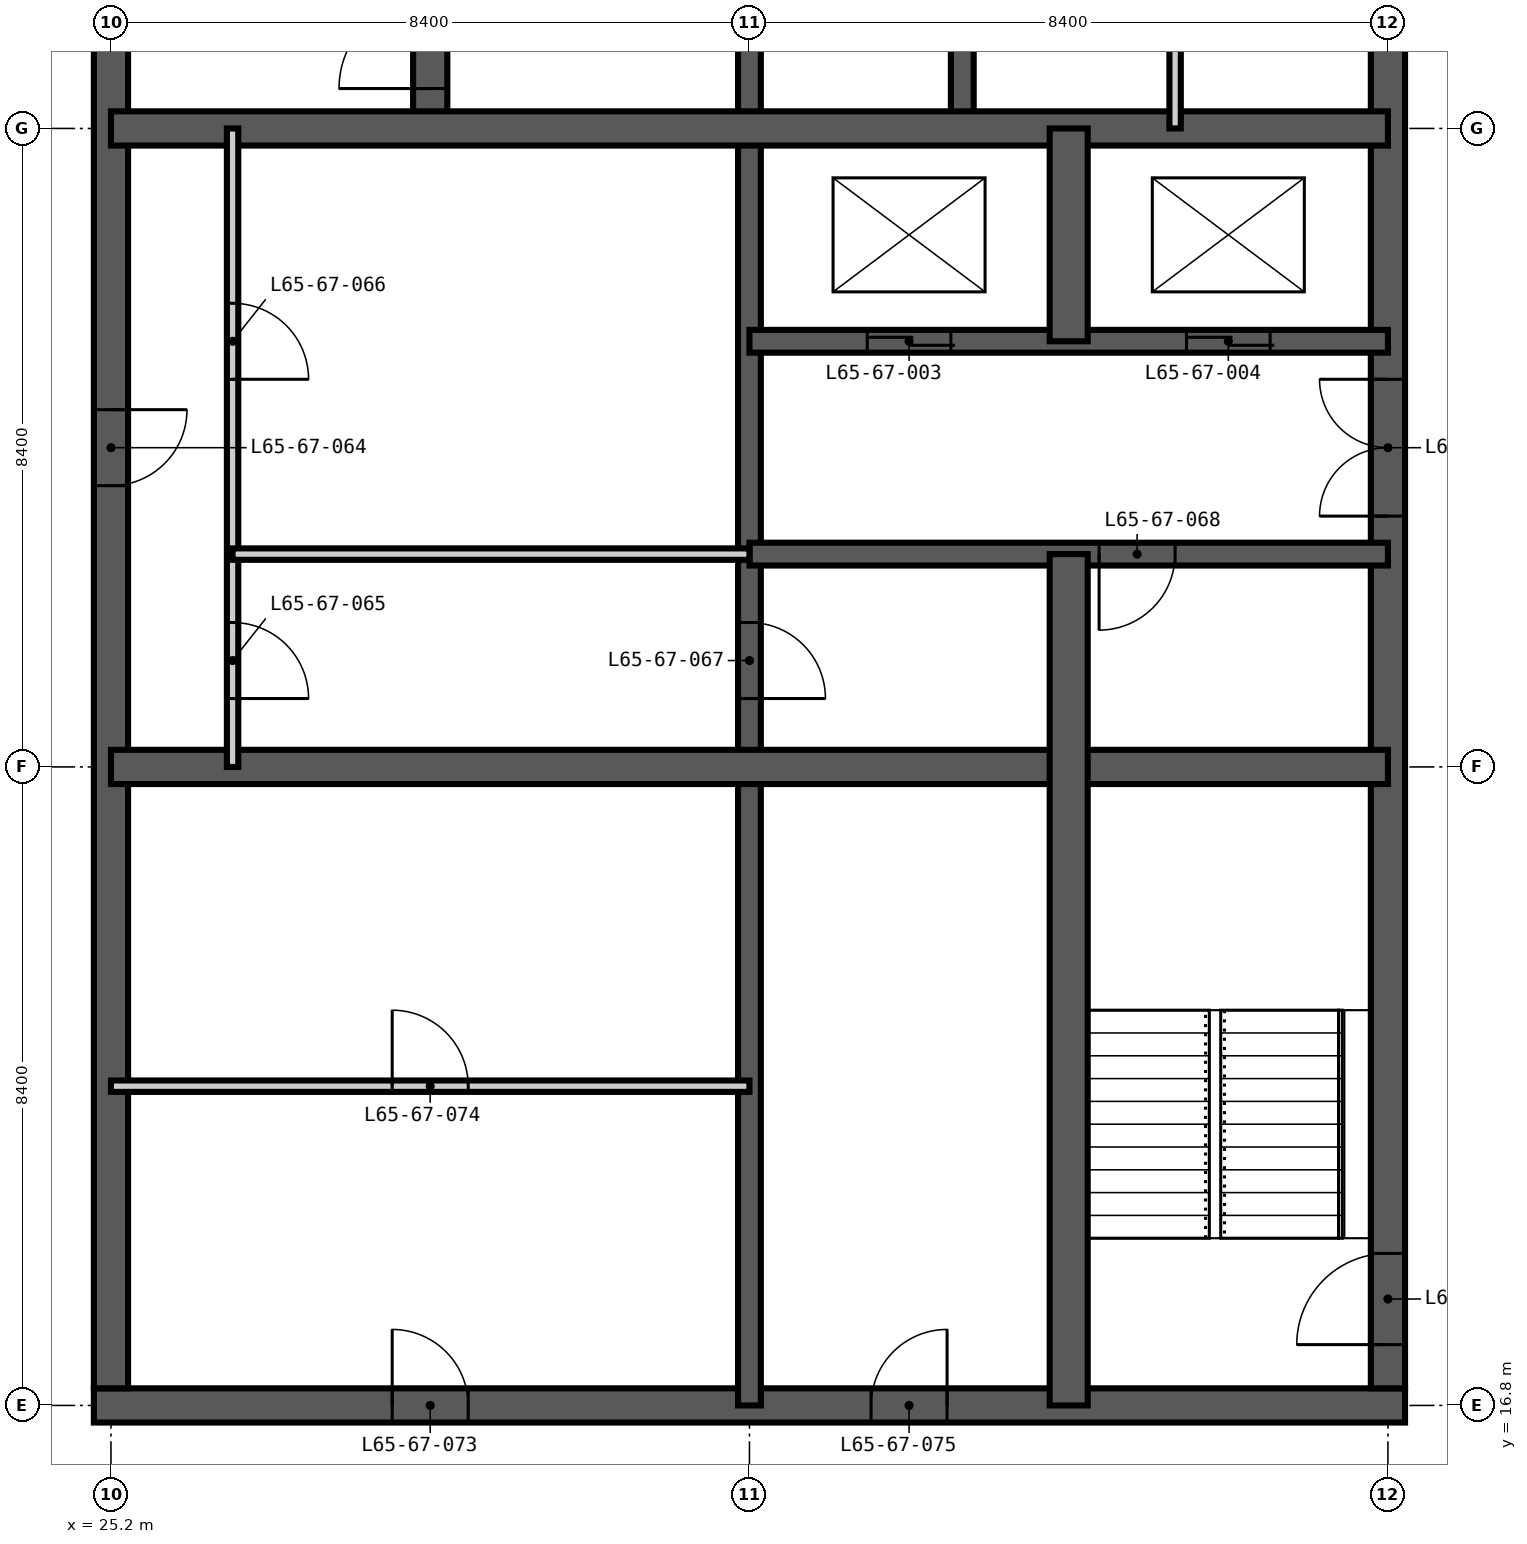
"""IFC4 building model, lengths in metres.
Left out: names, types, materials, properties, quantities, classifications, styles, units other than length and angle.
Written with IfcOpenShell. Run it as: python <this file> out.ifc"""

import sys

from ifc_helpers import new_model, si_unit, direction, frame, frame_2d, origin, place, context, subcontext, project, spatial, rectangle, extrude, element, fill, save


model = new_model("IFC4")
c1 = context("Model", 3, precision=1e-05, world=origin(), true_north=direction((0.0, 1.0)))
c2 = subcontext(c1, "Body", "Model", "MODEL_VIEW")
j1 = project(units=[si_unit("LENGTHUNIT", "METRE"), si_unit("PLANEANGLEUNIT", "RADIAN")], contexts=[c1])
p1 = place(None, origin())
s1 = spatial("IfcSite", under=j1, at=p1, CompositionType="ELEMENT")
p2 = place(p1, origin())
s2 = spatial("IfcBuilding", under=s1, at=p2, CompositionType="ELEMENT")
p3 = place(p2, frame((0.0, 0.0, 252.9)))
s3 = spatial("IfcBuildingStorey", under=s2, at=p3, CompositionType="ELEMENT", Elevation=252.9)
p4 = place(p3, frame((24.975, 16.8, -0.35), z_axis=(0.0, 0.0, 1.0), x_axis=(1.0, 0.0, 0.0)))
e1 = element("IfcWall", 1, at=p4, inside=s3, PredefinedType="SHEAR", context=c2, shape_type="SweptSolid", body=[
    extrude(rectangle(XDim=17.25, YDim=0.45, at=frame_2d((8.625, 0.0))), origin(), (0.0, 0.0, 1.0), 3.9),
])
p5 = place(p4, frame((3.925, 0.0, 0.35)))
e2 = element("IfcOpeningElement", 2, at=p5, cuts=e1, PredefinedType="OPENING", context=c2, shape_type="SweptSolid", body=[
    extrude(rectangle(XDim=1.0, YDim=2.1, at=frame_2d((0.5, 1.05))), frame((0.0, 0.235, 0.0), z_axis=(0.0, -1.0, 0.0), x_axis=(1.0, 0.0, 0.0)), (0.0, 0.0, 1.0), 0.47),
])
p6 = place(p4, frame((10.225, 0.0, 0.35)))
e3 = element("IfcOpeningElement", 3, at=p6, cuts=e1, PredefinedType="OPENING", context=c2, shape_type="SweptSolid", body=[
    extrude(rectangle(XDim=1.0, YDim=2.1, at=frame_2d((0.5, 1.05))), frame((0.0, 0.235, 0.0), z_axis=(0.0, -1.0, 0.0), x_axis=(1.0, 0.0, 0.0)), (0.0, 0.0, 1.0), 0.47),
])
p7 = place(p3, frame((42.0, 17.025, -0.35), z_axis=(0.0, 0.0, 1.0), x_axis=(0.0, 1.0, 0.0)))
e4 = element("IfcWall", 4, at=p7, inside=s3, PredefinedType="SHEAR", context=c2, shape_type="SweptSolid", body=[
    extrude(rectangle(XDim=24.75, YDim=0.45, at=frame_2d((12.375, 0.0))), origin(), (0.0, 0.0, 1.0), 3.9),
])
p8 = place(p7, frame((0.575, 0.0, 0.35)))
e5 = element("IfcOpeningElement", 5, at=p8, cuts=e4, PredefinedType="OPENING", context=c2, shape_type="SweptSolid", body=[
    extrude(rectangle(XDim=1.2, YDim=2.2, at=frame_2d((0.6, 1.1))), frame((0.0, 0.235, 0.0), z_axis=(0.0, -1.0, 0.0), x_axis=(1.0, 0.0, 0.0)), (0.0, 0.0, 1.0), 0.47),
])
p9 = place(p7, frame((11.475, 0.0, 0.35)))
e6 = element("IfcOpeningElement", 6, at=p9, cuts=e4, PredefinedType="OPENING", context=c2, shape_type="SweptSolid", body=[
    extrude(rectangle(XDim=1.8, YDim=2.2, at=frame_2d((0.9, 1.1))), frame((0.0, 0.235, 0.0), z_axis=(0.0, -1.0, 0.0), x_axis=(1.0, 0.0, 0.0)), (0.0, 0.0, 1.0), 0.47),
])
p10 = place(p7, frame((20.275, 0.0, 0.35)))
e7 = element("IfcOpeningElement", 7, at=p10, cuts=e4, PredefinedType="OPENING", context=c2, shape_type="SweptSolid", body=[
    extrude(rectangle(XDim=1.0, YDim=2.1, at=frame_2d((0.5, 1.05))), frame((0.0, 0.235, 0.0), z_axis=(0.0, -1.0, 0.0), x_axis=(1.0, 0.0, 0.0)), (0.0, 0.0, 1.0), 0.47),
])
p11 = place(p3, frame((25.2, 41.775, -0.35), z_axis=(0.0, 0.0, 1.0), x_axis=(0.0, -1.0, 0.0)))
e8 = element("IfcWall", 8, at=p11, inside=s3, PredefinedType="SHEAR", context=c2, shape_type="SweptSolid", body=[
    extrude(rectangle(XDim=24.75, YDim=0.45, at=frame_2d((12.375, 0.0))), origin(), (0.0, 0.0, 1.0), 3.9),
])
p12 = place(p11, frame((11.875, 0.0, 0.35)))
e9 = element("IfcOpeningElement", 9, at=p12, cuts=e8, PredefinedType="OPENING", context=c2, shape_type="SweptSolid", body=[
    extrude(rectangle(XDim=1.0, YDim=2.1, at=frame_2d((0.5, 1.05))), frame((0.0, 0.235, 0.0), z_axis=(0.0, -1.0, 0.0), x_axis=(1.0, 0.0, 0.0)), (0.0, 0.0, 1.0), 0.47),
])
p13 = place(p3, frame((33.6, 16.8, -0.35), z_axis=(0.0, 0.0, 1.0), x_axis=(0.0, 1.0, 0.0)))
e10 = element("IfcWall", 10, at=p13, inside=s3, PredefinedType="SHEAR", context=c2, shape_type="SweptSolid", body=[
    extrude(rectangle(XDim=25.2, YDim=0.3, at=frame_2d((12.6, 0.0))), origin(), (0.0, 0.0, 1.0), 3.9),
])
p14 = place(p13, frame((22.5, 0.0, 0.35)))
e11 = element("IfcOpeningElement", 11, at=p14, cuts=e10, PredefinedType="OPENING", context=c2, shape_type="SweptSolid", body=[
    extrude(rectangle(XDim=1.2, YDim=2.2, at=frame_2d((0.6, 1.1))), frame((0.0, 0.16, 0.0), z_axis=(0.0, -1.0, 0.0), x_axis=(1.0, 0.0, 0.0)), (0.0, 0.0, 1.0), 0.32),
])
p15 = place(p13, frame((18.3, 0.0, 0.35)))
e12 = element("IfcOpeningElement", 12, at=p15, cuts=e10, PredefinedType="OPENING", context=c2, shape_type="SweptSolid", body=[
    extrude(rectangle(XDim=1.2, YDim=2.2, at=frame_2d((0.6, 1.1))), frame((0.0, 0.16, 0.0), z_axis=(0.0, -1.0, 0.0), x_axis=(1.0, 0.0, 0.0)), (0.0, 0.0, 1.0), 0.32),
])
p16 = place(p13, frame((9.3, 0.0, 0.35)))
e13 = element("IfcOpeningElement", 13, at=p16, cuts=e10, PredefinedType="OPENING", context=c2, shape_type="SweptSolid", body=[
    extrude(rectangle(XDim=1.0, YDim=2.1, at=frame_2d((0.5, 1.05))), frame((0.0, 0.16, 0.0), z_axis=(0.0, -1.0, 0.0), x_axis=(1.0, 0.0, 0.0)), (0.0, 0.0, 1.0), 0.32),
])
p17 = place(p3, frame((36.4, 33.6, -0.35), z_axis=(0.0, 0.0, 1.0), x_axis=(0.0, 1.0, 0.0)))
e14 = element("IfcWall", 14, at=p17, inside=s3, PredefinedType="SHEAR", context=c2, shape_type="SweptSolid", body=[
    extrude(rectangle(XDim=8.4, YDim=0.3, at=frame_2d((4.2, 0.0))), origin(), (0.0, 0.0, 1.0), 3.9),
])
p18 = place(p3, frame((33.6, 28.0, -0.35), z_axis=(0.0, 0.0, 1.0), x_axis=(1.0, 0.0, 0.0)))
e15 = element("IfcWall", 15, at=p18, inside=s3, PredefinedType="SHEAR", context=c2, shape_type="SweptSolid", body=[
    extrude(rectangle(XDim=8.4, YDim=0.3, at=frame_2d((4.2, 0.0))), origin(), (0.0, 0.0, 1.0), 3.9),
])
p19 = place(p18, frame((4.6, 0.0, 0.35)))
e16 = element("IfcOpeningElement", 16, at=p19, cuts=e15, PredefinedType="OPENING", context=c2, shape_type="SweptSolid", body=[
    extrude(rectangle(XDim=1.0, YDim=2.1, at=frame_2d((0.5, 1.05))), frame((0.0, 0.16, 0.0), z_axis=(0.0, -1.0, 0.0), x_axis=(1.0, 0.0, 0.0)), (0.0, 0.0, 1.0), 0.32),
])
p20 = place(p3, frame((33.6, 30.8, -0.35), z_axis=(0.0, 0.0, 1.0), x_axis=(1.0, 0.0, 0.0)))
e17 = element("IfcWall", 17, at=p20, inside=s3, PredefinedType="SHEAR", context=c2, shape_type="SweptSolid", body=[
    extrude(rectangle(XDim=8.4, YDim=0.3, at=frame_2d((4.2, 0.0))), origin(), (0.0, 0.0, 1.0), 3.9),
])
p21 = place(p20, frame((1.55, 0.0, 0.35)))
e18 = element("IfcOpeningElement", 18, at=p21, cuts=e17, PredefinedType="OPENING", context=c2, shape_type="SweptSolid", body=[
    extrude(rectangle(XDim=1.1, YDim=2.2, at=frame_2d((0.55, 1.1))), frame((0.0, 0.16, 0.0), z_axis=(0.0, -1.0, 0.0), x_axis=(1.0, 0.0, 0.0)), (0.0, 0.0, 1.0), 0.32),
])
p22 = place(p20, frame((5.75, 0.0, 0.35)))
e19 = element("IfcOpeningElement", 19, at=p22, cuts=e17, PredefinedType="OPENING", context=c2, shape_type="SweptSolid", body=[
    extrude(rectangle(XDim=1.1, YDim=2.2, at=frame_2d((0.55, 1.1))), frame((0.0, 0.16, 0.0), z_axis=(0.0, -1.0, 0.0), x_axis=(1.0, 0.0, 0.0)), (0.0, 0.0, 1.0), 0.32),
])
p23 = place(p3, frame((29.4, 33.6, -0.35), z_axis=(0.0, 0.0, 1.0), x_axis=(0.0, 1.0, 0.0)))
e20 = element("IfcWall", 20, at=p23, inside=s3, PredefinedType="SHEAR", context=c2, shape_type="SweptSolid", body=[
    extrude(rectangle(XDim=8.4, YDim=0.45, at=frame_2d((4.2, 0.0))), origin(), (0.0, 0.0, 1.0), 3.9),
])
p24 = place(p23, frame((0.525, 0.0, 0.35)))
e21 = element("IfcOpeningElement", 21, at=p24, cuts=e20, PredefinedType="OPENING", context=c2, shape_type="SweptSolid", body=[
    extrude(rectangle(XDim=1.2, YDim=2.2, at=frame_2d((0.6, 1.1))), frame((0.0, 0.235, 0.0), z_axis=(0.0, -1.0, 0.0), x_axis=(1.0, 0.0, 0.0)), (0.0, 0.0, 1.0), 0.47),
])
for number, where, z_axis, x_axis in (
    (22, (25.2, 25.2, -0.35), (0.0, 0.0, 1.0), (1.0, 0.0, 0.0)),
    (23, (25.2, 33.6, -0.35), (0.0, 0.0, 1.0), (1.0, 0.0, 0.0)),
):
    element("IfcWall", number, at=place(p3, frame(where, z_axis=z_axis, x_axis=x_axis)), inside=s3, PredefinedType="SHEAR", context=c2, shape_type="SweptSolid", body=[
        extrude(rectangle(XDim=16.8, YDim=0.45, at=frame_2d((8.4, 0.0))), origin(), (0.0, 0.0, 1.0), 3.9),
    ])
p25 = place(p3, frame((37.8, 16.8, -0.35), z_axis=(0.0, 0.0, 1.0), x_axis=(0.0, 1.0, 0.0)))
e24 = element("IfcWall", 24, at=p25, inside=s3, PredefinedType="SHEAR", context=c2, shape_type="SweptSolid", body=[
    extrude(rectangle(XDim=11.2, YDim=0.5, at=frame_2d((5.6, 0.0))), origin(), (0.0, 0.0, 1.0), 3.9),
])
p26 = place(p3, frame((37.8, 30.8, -0.35), z_axis=(0.0, 0.0, 1.0), x_axis=(0.0, 1.0, 0.0)))
e25 = element("IfcWall", 25, at=p26, inside=s3, PredefinedType="SHEAR", context=c2, shape_type="SweptSolid", body=[
    extrude(rectangle(XDim=2.8, YDim=0.5, at=frame_2d((1.4, 0.0))), origin(), (0.0, 0.0, 1.0), 3.9),
])
p27 = place(p3, frame((26.8, 25.2, 0.0), z_axis=(0.0, 0.0, 1.0), x_axis=(0.0, 1.0, 0.0)))
e26 = element("IfcWall", 26, at=p27, inside=s3, PredefinedType="PARTITIONING", context=c2, shape_type="SweptSolid", body=[
    extrude(rectangle(XDim=8.4, YDim=0.15, at=frame_2d((4.2, 0.0))), origin(), (0.0, 0.0, 1.0), 3.55),
])
p28 = place(p27, frame((0.9, 0.0, 0.0)))
e27 = element("IfcOpeningElement", 27, at=p28, cuts=e26, PredefinedType="OPENING", context=c2, shape_type="SweptSolid", body=[
    extrude(rectangle(XDim=1.0, YDim=2.1, at=frame_2d((0.5, 1.05))), frame((0.0, 0.085, 0.0), z_axis=(0.0, -1.0, 0.0), x_axis=(1.0, 0.0, 0.0)), (0.0, 0.0, 1.0), 0.17),
])
p29 = place(p27, frame((5.1, 0.0, 0.0)))
e28 = element("IfcOpeningElement", 28, at=p29, cuts=e26, PredefinedType="OPENING", context=c2, shape_type="SweptSolid", body=[
    extrude(rectangle(XDim=1.0, YDim=2.1, at=frame_2d((0.5, 1.05))), frame((0.0, 0.085, 0.0), z_axis=(0.0, -1.0, 0.0), x_axis=(1.0, 0.0, 0.0)), (0.0, 0.0, 1.0), 0.17),
])
p30 = place(p3, frame((39.2, 33.6, 0.0), z_axis=(0.0, 0.0, 1.0), x_axis=(0.0, 1.0, 0.0)))
e29 = element("IfcWall", 29, at=p30, inside=s3, PredefinedType="PARTITIONING", context=c2, shape_type="SweptSolid", body=[
    extrude(rectangle(XDim=8.4, YDim=0.15, at=frame_2d((4.2, 0.0))), origin(), (0.0, 0.0, 1.0), 3.55),
])
p31 = place(p30, frame((3.7, 0.0, 0.0)))
e30 = element("IfcOpeningElement", 30, at=p31, cuts=e29, PredefinedType="OPENING", context=c2, shape_type="SweptSolid", body=[
    extrude(rectangle(XDim=1.0, YDim=2.1, at=frame_2d((0.5, 1.05))), frame((0.0, 0.085, 0.0), z_axis=(0.0, -1.0, 0.0), x_axis=(1.0, 0.0, 0.0)), (0.0, 0.0, 1.0), 0.17),
])
p32 = place(p3, frame((25.2, 21.0, 0.0), z_axis=(0.0, 0.0, 1.0), x_axis=(1.0, 0.0, 0.0)))
e31 = element("IfcWall", 31, at=p32, inside=s3, PredefinedType="PARTITIONING", context=c2, shape_type="SweptSolid", body=[
    extrude(rectangle(XDim=8.4, YDim=0.15, at=frame_2d((4.2, 0.0))), origin(), (0.0, 0.0, 1.0), 3.55),
])
p33 = place(p32, frame((3.7, 0.0, 0.0)))
e32 = element("IfcOpeningElement", 32, at=p33, cuts=e31, PredefinedType="OPENING", context=c2, shape_type="SweptSolid", body=[
    extrude(rectangle(XDim=1.0, YDim=2.1, at=frame_2d((0.5, 1.05))), frame((0.0, 0.085, 0.0), z_axis=(0.0, -1.0, 0.0), x_axis=(1.0, 0.0, 0.0)), (0.0, 0.0, 1.0), 0.17),
])
p34 = place(p3, frame((26.8, 28.0, 0.0), z_axis=(0.0, 0.0, 1.0), x_axis=(1.0, 0.0, 0.0)))
e33 = element("IfcWall", 33, at=p34, inside=s3, PredefinedType="PARTITIONING", context=c2, shape_type="SweptSolid", body=[
    extrude(rectangle(XDim=6.8, YDim=0.15, at=frame_2d((3.4, 0.0))), origin(), (0.0, 0.0, 1.0), 3.55),
])
p35 = place(p24, origin())
e34 = element("IfcDoor", 34, at=p35, inside=s3, OperationType="SINGLE_SWING_LEFT", PredefinedType="DOOR", context=c2, shape_type="SweptSolid", body=[
    extrude(rectangle(XDim=1.2, YDim=2.2, at=frame_2d((0.6, 1.1))), frame((0.0, 0.025, 0.0), z_axis=(0.0, -1.0, 0.0), x_axis=(1.0, 0.0, 0.0)), (0.0, 0.0, 1.0), 0.05),
])
fill(e21, e34)
p36 = place(p8, origin())
e35 = element("IfcDoor", 35, at=p36, inside=s3, OperationType="SINGLE_SWING_LEFT", PredefinedType="DOOR", context=c2, shape_type="SweptSolid", body=[
    extrude(rectangle(XDim=1.2, YDim=2.2, at=frame_2d((0.6, 1.1))), frame((0.0, 0.025, 0.0), z_axis=(0.0, -1.0, 0.0), x_axis=(1.0, 0.0, 0.0)), (0.0, 0.0, 1.0), 0.05),
])
fill(e5, e35)
p37 = place(p21, origin())
e36 = element("IfcDoor", 36, at=p37, inside=s3, OperationType="DOUBLE_DOOR_SLIDING", PredefinedType="DOOR", context=c2, shape_type="SweptSolid", body=[
    extrude(rectangle(XDim=1.1, YDim=2.2, at=frame_2d((0.55, 1.1))), frame((0.0, 0.025, 0.0), z_axis=(0.0, -1.0, 0.0), x_axis=(1.0, 0.0, 0.0)), (0.0, 0.0, 1.0), 0.05),
])
fill(e18, e36)
p38 = place(p22, origin())
e37 = element("IfcDoor", 37, at=p38, inside=s3, OperationType="DOUBLE_DOOR_SLIDING", PredefinedType="DOOR", context=c2, shape_type="SweptSolid", body=[
    extrude(rectangle(XDim=1.1, YDim=2.2, at=frame_2d((0.55, 1.1))), frame((0.0, 0.025, 0.0), z_axis=(0.0, -1.0, 0.0), x_axis=(1.0, 0.0, 0.0)), (0.0, 0.0, 1.0), 0.05),
])
fill(e19, e37)
p39 = place(p12, origin())
e38 = element("IfcDoor", 38, at=p39, inside=s3, OperationType="SINGLE_SWING_LEFT", PredefinedType="DOOR", context=c2, shape_type="SweptSolid", body=[
    extrude(rectangle(XDim=1.0, YDim=2.1, at=frame_2d((0.5, 1.05))), frame((0.0, 0.025, 0.0), z_axis=(0.0, -1.0, 0.0), x_axis=(1.0, 0.0, 0.0)), (0.0, 0.0, 1.0), 0.05),
])
fill(e9, e38)
p40 = place(p28, frame((1.0, 0.0, 0.0), z_axis=(0.0, 0.0, 1.0), x_axis=(-1.0, 0.0, 0.0)))
e39 = element("IfcDoor", 39, at=p40, inside=s3, OperationType="SINGLE_SWING_RIGHT", PredefinedType="DOOR", context=c2, shape_type="SweptSolid", body=[
    extrude(rectangle(XDim=1.0, YDim=2.1, at=frame_2d((0.5, 1.05))), frame((0.0, 0.025, 0.0), z_axis=(0.0, -1.0, 0.0), x_axis=(1.0, 0.0, 0.0)), (0.0, 0.0, 1.0), 0.05),
])
fill(e27, e39)
p41 = place(p29, frame((1.0, 0.0, 0.0), z_axis=(0.0, 0.0, 1.0), x_axis=(-1.0, 0.0, 0.0)))
e40 = element("IfcDoor", 40, at=p41, inside=s3, OperationType="SINGLE_SWING_RIGHT", PredefinedType="DOOR", context=c2, shape_type="SweptSolid", body=[
    extrude(rectangle(XDim=1.0, YDim=2.1, at=frame_2d((0.5, 1.05))), frame((0.0, 0.025, 0.0), z_axis=(0.0, -1.0, 0.0), x_axis=(1.0, 0.0, 0.0)), (0.0, 0.0, 1.0), 0.05),
])
fill(e28, e40)
p42 = place(p16, frame((1.0, 0.0, 0.0), z_axis=(0.0, 0.0, 1.0), x_axis=(-1.0, 0.0, 0.0)))
e41 = element("IfcDoor", 41, at=p42, inside=s3, OperationType="SINGLE_SWING_RIGHT", PredefinedType="DOOR", context=c2, shape_type="SweptSolid", body=[
    extrude(rectangle(XDim=1.0, YDim=2.1, at=frame_2d((0.5, 1.05))), frame((0.0, 0.025, 0.0), z_axis=(0.0, -1.0, 0.0), x_axis=(1.0, 0.0, 0.0)), (0.0, 0.0, 1.0), 0.05),
])
fill(e13, e41)
p43 = place(p19, frame((1.0, 0.0, 0.0), z_axis=(0.0, 0.0, 1.0), x_axis=(-1.0, 0.0, 0.0)))
e42 = element("IfcDoor", 42, at=p43, inside=s3, OperationType="SINGLE_SWING_RIGHT", PredefinedType="DOOR", context=c2, shape_type="SweptSolid", body=[
    extrude(rectangle(XDim=1.0, YDim=2.1, at=frame_2d((0.5, 1.05))), frame((0.0, 0.025, 0.0), z_axis=(0.0, -1.0, 0.0), x_axis=(1.0, 0.0, 0.0)), (0.0, 0.0, 1.0), 0.05),
])
fill(e16, e42)
p44 = place(p9, origin())
e43 = element("IfcDoor", 43, at=p44, inside=s3, OperationType="DOUBLE_DOOR_DOUBLE_SWING", PredefinedType="DOOR", context=c2, shape_type="SweptSolid", body=[
    extrude(rectangle(XDim=1.8, YDim=2.2, at=frame_2d((0.9, 1.1))), frame((0.0, 0.025, 0.0), z_axis=(0.0, -1.0, 0.0), x_axis=(1.0, 0.0, 0.0)), (0.0, 0.0, 1.0), 0.05),
])
fill(e6, e43)
p45 = place(p5, origin())
e44 = element("IfcDoor", 44, at=p45, inside=s3, OperationType="SINGLE_SWING_LEFT", PredefinedType="DOOR", context=c2, shape_type="SweptSolid", body=[
    extrude(rectangle(XDim=1.0, YDim=2.1, at=frame_2d((0.5, 1.05))), frame((0.0, 0.025, 0.0), z_axis=(0.0, -1.0, 0.0), x_axis=(1.0, 0.0, 0.0)), (0.0, 0.0, 1.0), 0.05),
])
fill(e2, e44)
p46 = place(p33, origin())
e45 = element("IfcDoor", 45, at=p46, inside=s3, OperationType="SINGLE_SWING_LEFT", PredefinedType="DOOR", context=c2, shape_type="SweptSolid", body=[
    extrude(rectangle(XDim=1.0, YDim=2.1, at=frame_2d((0.5, 1.05))), frame((0.0, 0.025, 0.0), z_axis=(0.0, -1.0, 0.0), x_axis=(1.0, 0.0, 0.0)), (0.0, 0.0, 1.0), 0.05),
])
fill(e32, e45)
p47 = place(p6, origin())
e46 = element("IfcDoor", 46, at=p47, inside=s3, OperationType="SINGLE_SWING_RIGHT", PredefinedType="DOOR", context=c2, shape_type="SweptSolid", body=[
    extrude(rectangle(XDim=1.0, YDim=2.1, at=frame_2d((0.5, 1.05))), frame((0.0, 0.025, 0.0), z_axis=(0.0, -1.0, 0.0), x_axis=(1.0, 0.0, 0.0)), (0.0, 0.0, 1.0), 0.05),
])
fill(e3, e46)
save(model, sys.argv[1])
